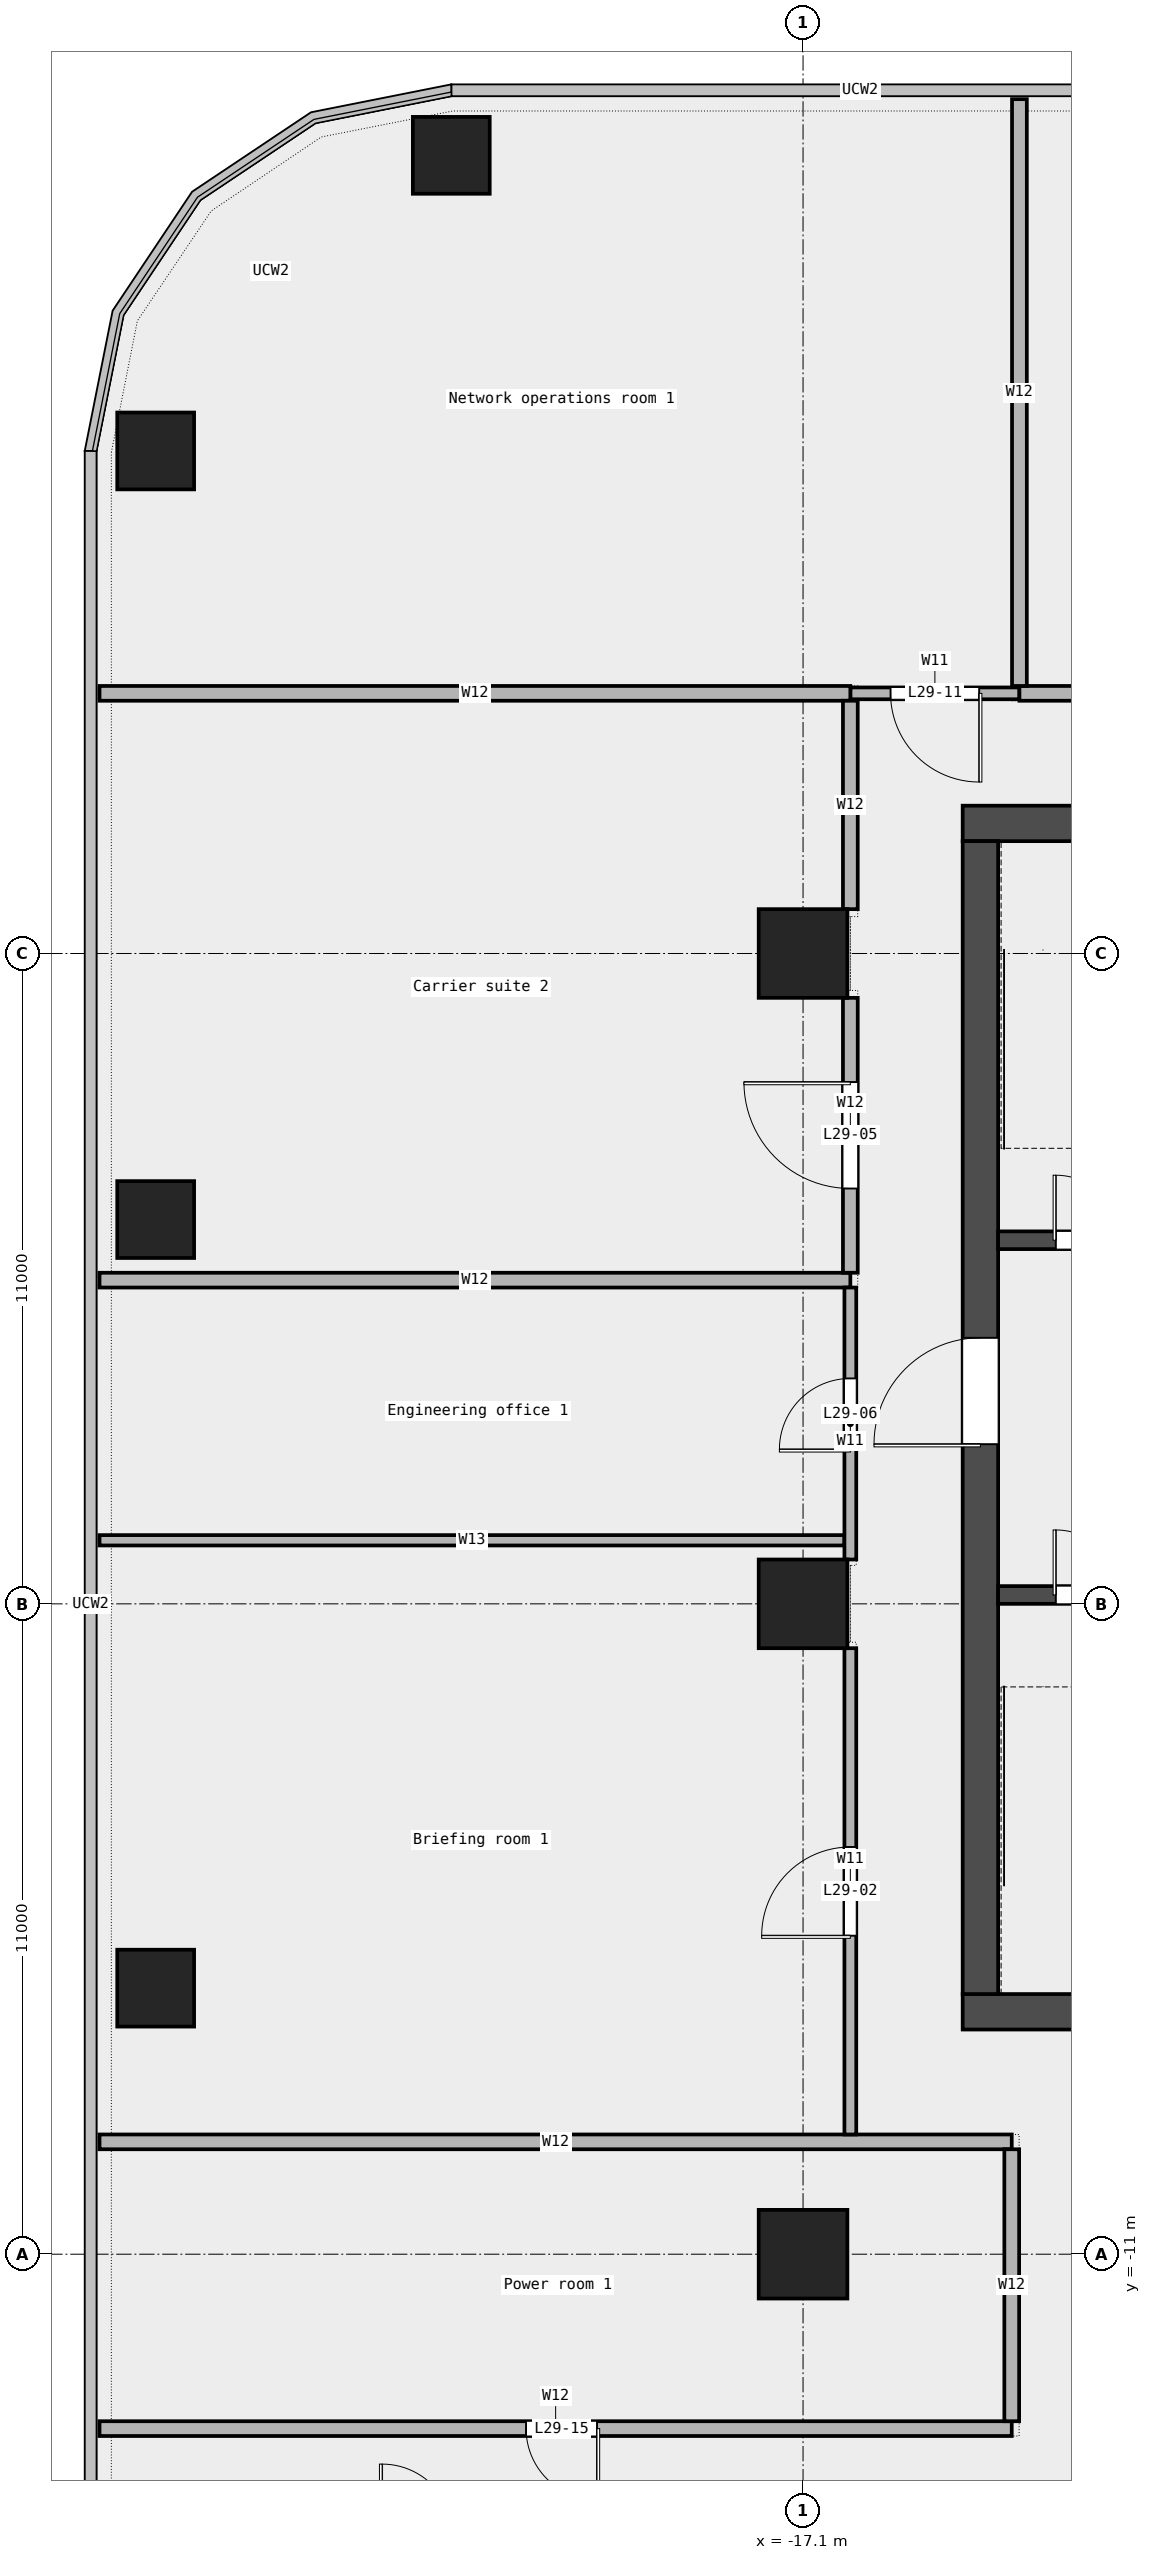
"""IFC4 building model, lengths in metres.
Left out: names, types, materials, properties, quantities, classifications, styles, units other than length and angle.
Written with IfcOpenShell. Run it as: python <this file> out.ifc"""

import sys

from ifc_helpers import new_model, si_unit, direction, frame, frame_2d, origin, origin_2d, place, context, subcontext, project, spatial, rectangle, extrude, element, fill, save


model = new_model("IFC4")
c1 = context("Model", 3, precision=1e-05, world=origin(), true_north=direction((0.0, 1.0)))
c2 = subcontext(c1, "Body", "Model", "MODEL_VIEW")
j1 = project(units=[si_unit("LENGTHUNIT", "METRE"), si_unit("PLANEANGLEUNIT", "RADIAN")], contexts=[c1])
p1 = place(None, origin())
s1 = spatial("IfcSite", under=j1, at=p1, CompositionType="ELEMENT")
p2 = place(p1, origin())
s2 = spatial("IfcBuilding", under=s1, at=p2, CompositionType="ELEMENT")
p3 = place(p2, frame((0.0, 0.0, 144.1)))
s3 = spatial("IfcBuildingStorey", under=s2, at=p3, CompositionType="ELEMENT", Elevation=144.1)
for number, where, z_axis, x_axis in (
    (1, (-23.05, 24.5, 0.0), (0.0, 0.0, 1.0), (1.0, 0.0, 0.0)),
    (2, (-28.05, 19.5, 0.0), (0.0, 0.0, 1.0), (1.0, 0.0, 0.0)),
    (3, (-28.05, 6.5, 0.0), (0.0, 0.0, 1.0), (1.0, 0.0, 0.0)),
    (4, (-28.05, -6.5, 0.0), (0.0, 0.0, 1.0), (1.0, 0.0, 0.0)),
):
    element("IfcColumn", number, at=place(p3, frame(where, z_axis=z_axis, x_axis=x_axis)), inside=s3, PredefinedType="COLUMN", context=c2, shape_type="SweptSolid", body=[
        extrude(rectangle(XDim=1.3, YDim=1.3, at=origin_2d()), origin(), (0.0, 0.0, 1.0), 3.9),
    ])
for number, where, z_axis, x_axis in (
    (5, (-17.1, -11.0, 0.0), (0.0, 0.0, 1.0), (1.0, 0.0, 0.0)),
    (6, (-17.1, 0.0, 0.0), (0.0, 0.0, 1.0), (1.0, 0.0, 0.0)),
    (7, (-17.1, 11.0, 0.0), (0.0, 0.0, 1.0), (1.0, 0.0, 0.0)),
):
    element("IfcColumn", number, at=place(p3, frame(where, z_axis=z_axis, x_axis=x_axis)), inside=s3, PredefinedType="COLUMN", context=c2, shape_type="SweptSolid", body=[
        extrude(rectangle(XDim=1.5, YDim=1.5, at=origin_2d()), origin(), (0.0, 0.0, 1.0), 3.9),
    ])
p4 = place(p3, frame((-29.0, -13.95, 0.0), z_axis=(0.0, 0.0, 1.0), x_axis=(1.0, 0.0, 0.0)))
e8 = element("IfcWall", 8, at=p4, inside=s3, PredefinedType="PARTITIONING", context=c2, shape_type="SweptSolid", body=[
    extrude(rectangle(XDim=15.43, YDim=0.25, at=frame_2d((7.715, 0.0))), origin(), (0.0, 0.0, 1.0), 3.9),
])
p5 = place(p4, frame((7.215, 0.0, 0.0)))
e9 = element("IfcOpeningElement", 9, at=p5, cuts=e8, PredefinedType="OPENING", context=c2, shape_type="SweptSolid", body=[
    extrude(rectangle(XDim=1.2, YDim=2.1, at=frame_2d((0.6, 1.05))), frame((0.0, 0.137, 0.0), z_axis=(0.0, -1.0, 0.0), x_axis=(1.0, 0.0, 0.0)), (0.0, 0.0, 1.0), 0.274),
])
p6 = place(p3, frame((-29.0, -9.1, 0.0), z_axis=(0.0, 0.0, 1.0), x_axis=(1.0, 0.0, 0.0)))
e10 = element("IfcWall", 10, at=p6, inside=s3, PredefinedType="PARTITIONING", context=c2, shape_type="SweptSolid", body=[
    extrude(rectangle(XDim=15.43, YDim=0.25, at=frame_2d((7.715, 0.0))), origin(), (0.0, 0.0, 1.0), 3.9),
])
p7 = place(p3, frame((-29.0, 1.075, 0.0), z_axis=(0.0, 0.0, 1.0), x_axis=(1.0, 0.0, 0.0)))
e11 = element("IfcWall", 11, at=p7, inside=s3, PredefinedType="PARTITIONING", context=c2, shape_type="SweptSolid", body=[
    extrude(rectangle(XDim=12.6, YDim=0.175, at=frame_2d((6.3, 0.0))), origin(), (0.0, 0.0, 1.0), 3.9),
])
p8 = place(p3, frame((-29.0, 5.475, 0.0), z_axis=(0.0, 0.0, 1.0), x_axis=(1.0, 0.0, 0.0)))
e12 = element("IfcWall", 12, at=p8, inside=s3, PredefinedType="PARTITIONING", context=c2, shape_type="SweptSolid", body=[
    extrude(rectangle(XDim=12.7, YDim=0.25, at=frame_2d((6.35, 0.0))), origin(), (0.0, 0.0, 1.0), 3.9),
])
p9 = place(p3, frame((-16.3, 15.4, 0.0), z_axis=(0.0, 0.0, 1.0), x_axis=(1.0, 0.0, 0.0)))
e13 = element("IfcWall", 13, at=p9, inside=s3, PredefinedType="PARTITIONING", context=c2, shape_type="SweptSolid", body=[
    extrude(rectangle(XDim=2.86, YDim=0.2, at=frame_2d((1.43, 0.0))), origin(), (0.0, 0.0, 1.0), 3.9),
])
p10 = place(p9, frame((0.68, 0.0, 0.0)))
e14 = element("IfcOpeningElement", 14, at=p10, cuts=e13, PredefinedType="OPENING", context=c2, shape_type="SweptSolid", body=[
    extrude(rectangle(XDim=1.5, YDim=2.1, at=frame_2d((0.75, 1.05))), frame((0.0, 0.112, 0.0), z_axis=(0.0, -1.0, 0.0), x_axis=(1.0, 0.0, 0.0)), (0.0, 0.0, 1.0), 0.224),
])
p11 = place(p3, frame((-29.0, 15.4, 0.0), z_axis=(0.0, 0.0, 1.0), x_axis=(1.0, 0.0, 0.0)))
e15 = element("IfcWall", 15, at=p11, inside=s3, PredefinedType="PARTITIONING", context=c2, shape_type="SweptSolid", body=[
    extrude(rectangle(XDim=12.7, YDim=0.25, at=frame_2d((6.35, 0.0))), origin(), (0.0, 0.0, 1.0), 3.9),
])
p12 = place(p3, frame((-13.44, 15.4, 0.0), z_axis=(0.0, 0.0, 1.0), x_axis=(1.0, 0.0, 0.0)))
e16 = element("IfcWall", 16, at=p12, inside=s3, PredefinedType="PARTITIONING", context=c2, shape_type="SweptSolid", body=[
    extrude(rectangle(XDim=4.22, YDim=0.25, at=frame_2d((2.11, 0.0))), origin(), (0.0, 0.0, 1.0), 3.9),
])
p13 = place(p12, frame((1.66, 0.0, 0.0)))
e17 = element("IfcOpeningElement", 17, at=p13, cuts=e16, PredefinedType="OPENING", context=c2, shape_type="SweptSolid", body=[
    extrude(rectangle(XDim=0.9, YDim=2.1, at=frame_2d((0.45, 1.05))), frame((0.0, 0.137, 0.0), z_axis=(0.0, -1.0, 0.0), x_axis=(1.0, 0.0, 0.0)), (0.0, 0.0, 1.0), 0.274),
])
p14 = place(p3, frame((-16.3, -8.975, 0.0), z_axis=(0.0, 0.0, 1.0), x_axis=(0.0, 1.0, 0.0)))
e18 = element("IfcWall", 18, at=p14, inside=s3, PredefinedType="PARTITIONING", context=c2, shape_type="SweptSolid", body=[
    extrude(rectangle(XDim=8.225, YDim=0.2, at=frame_2d((4.113, 0.0))), origin(), (0.0, 0.0, 1.0), 3.9),
])
p15 = place(p14, frame((3.363, 0.0, 0.0)))
e19 = element("IfcOpeningElement", 19, at=p15, cuts=e18, PredefinedType="OPENING", context=c2, shape_type="SweptSolid", body=[
    extrude(rectangle(XDim=1.5, YDim=2.1, at=frame_2d((0.75, 1.05))), frame((0.0, 0.112, 0.0), z_axis=(0.0, -1.0, 0.0), x_axis=(1.0, 0.0, 0.0)), (0.0, 0.0, 1.0), 0.224),
])
p16 = place(p3, frame((-16.3, 0.75, 0.0), z_axis=(0.0, 0.0, 1.0), x_axis=(0.0, 1.0, 0.0)))
e20 = element("IfcWall", 20, at=p16, inside=s3, PredefinedType="PARTITIONING", context=c2, shape_type="SweptSolid", body=[
    extrude(rectangle(XDim=4.6, YDim=0.2, at=frame_2d((2.3, 0.0))), origin(), (0.0, 0.0, 1.0), 3.9),
])
p17 = place(p16, frame((1.863, 0.0, 0.0)))
e21 = element("IfcOpeningElement", 21, at=p17, cuts=e20, PredefinedType="OPENING", context=c2, shape_type="SweptSolid", body=[
    extrude(rectangle(XDim=1.2, YDim=2.1, at=frame_2d((0.6, 1.05))), frame((0.0, 0.112, 0.0), z_axis=(0.0, -1.0, 0.0), x_axis=(1.0, 0.0, 0.0)), (0.0, 0.0, 1.0), 0.224),
])
p18 = place(p3, frame((-16.3, 5.6, 0.0), z_axis=(0.0, 0.0, 1.0), x_axis=(0.0, 1.0, 0.0)))
e22 = element("IfcWall", 22, at=p18, inside=s3, PredefinedType="PARTITIONING", context=c2, shape_type="SweptSolid", body=[
    extrude(rectangle(XDim=4.65, YDim=0.25, at=frame_2d((2.325, 0.0))), origin(), (0.0, 0.0, 1.0), 3.9),
])
p19 = place(p18, frame((1.425, 0.0, 0.0)))
e23 = element("IfcOpeningElement", 23, at=p19, cuts=e22, PredefinedType="OPENING", context=c2, shape_type="SweptSolid", body=[
    extrude(rectangle(XDim=1.8, YDim=2.1, at=frame_2d((0.9, 1.05))), frame((0.0, 0.137, 0.0), z_axis=(0.0, -1.0, 0.0), x_axis=(1.0, 0.0, 0.0)), (0.0, 0.0, 1.0), 0.274),
])
p20 = place(p3, frame((-16.3, 11.75, 0.0), z_axis=(0.0, 0.0, 1.0), x_axis=(0.0, 1.0, 0.0)))
e24 = element("IfcWall", 24, at=p20, inside=s3, PredefinedType="PARTITIONING", context=c2, shape_type="SweptSolid", body=[
    extrude(rectangle(XDim=3.525, YDim=0.25, at=frame_2d((1.762, 0.0))), origin(), (0.0, 0.0, 1.0), 3.9),
])
p21 = place(p3, frame((-13.57, -13.825, 0.0), z_axis=(0.0, 0.0, 1.0), x_axis=(0.0, 1.0, 0.0)))
e25 = element("IfcWall", 25, at=p21, inside=s3, PredefinedType="PARTITIONING", context=c2, shape_type="SweptSolid", body=[
    extrude(rectangle(XDim=4.6, YDim=0.25, at=frame_2d((2.3, 0.0))), origin(), (0.0, 0.0, 1.0), 3.9),
])
p22 = place(p3, frame((-13.44, 15.525, 0.0), z_axis=(0.0, 0.0, 1.0), x_axis=(0.0, 1.0, 0.0)))
e26 = element("IfcWall", 26, at=p22, inside=s3, PredefinedType="PARTITIONING", context=c2, shape_type="SweptSolid", body=[
    extrude(rectangle(XDim=9.925, YDim=0.25, at=frame_2d((4.962, 0.0))), origin(), (0.0, 0.0, 1.0), 3.9),
])
p23 = place(p3, frame((-14.4, -6.9, 0.0), z_axis=(0.0, 0.0, 1.0), x_axis=(1.0, 0.0, 0.0)))
e27 = element("IfcWall", 27, at=p23, inside=s3, PredefinedType="SHEAR", context=c2, shape_type="SweptSolid", body=[
    extrude(rectangle(XDim=28.8, YDim=0.6, at=frame_2d((14.4, 0.0))), origin(), (0.0, 0.0, 1.0), 4.2),
])
p24 = place(p23, frame((4.9, 0.0, 0.0)))
e28 = element("IfcOpeningElement", 28, at=p24, cuts=e27, PredefinedType="OPENING", context=c2, shape_type="SweptSolid", body=[
    extrude(rectangle(XDim=1.0, YDim=2.1, at=frame_2d((0.5, 1.05))), frame((0.0, 0.312, 0.0), z_axis=(0.0, -1.0, 0.0), x_axis=(1.0, 0.0, 0.0)), (0.0, 0.0, 1.0), 0.624),
])
p25 = place(p23, frame((9.3, 0.0, 0.0)))
e29 = element("IfcOpeningElement", 29, at=p25, cuts=e27, PredefinedType="OPENING", context=c2, shape_type="SweptSolid", body=[
    extrude(rectangle(XDim=1.2, YDim=2.1, at=frame_2d((0.6, 1.05))), frame((0.0, 0.312, 0.0), z_axis=(0.0, -1.0, 0.0), x_axis=(1.0, 0.0, 0.0)), (0.0, 0.0, 1.0), 0.624),
])
p26 = place(p23, frame((14.462, 0.0, 0.0)))
e30 = element("IfcOpeningElement", 30, at=p26, cuts=e27, PredefinedType="OPENING", context=c2, shape_type="SweptSolid", body=[
    extrude(rectangle(XDim=1.0, YDim=2.1, at=frame_2d((0.5, 1.05))), frame((0.0, 0.312, 0.0), z_axis=(0.0, -1.0, 0.0), x_axis=(1.0, 0.0, 0.0)), (0.0, 0.0, 1.0), 0.624),
])
p27 = place(p23, frame((18.75, 0.0, 0.0)))
e31 = element("IfcOpeningElement", 31, at=p27, cuts=e27, PredefinedType="OPENING", context=c2, shape_type="SweptSolid", body=[
    extrude(rectangle(XDim=1.8, YDim=2.1, at=frame_2d((0.9, 1.05))), frame((0.0, 0.312, 0.0), z_axis=(0.0, -1.0, 0.0), x_axis=(1.0, 0.0, 0.0)), (0.0, 0.0, 1.0), 0.624),
])
p28 = place(p23, frame((23.087, 0.0, 0.0)))
e32 = element("IfcOpeningElement", 32, at=p28, cuts=e27, PredefinedType="OPENING", context=c2, shape_type="SweptSolid", body=[
    extrude(rectangle(XDim=1.0, YDim=2.1, at=frame_2d((0.5, 1.05))), frame((0.0, 0.312, 0.0), z_axis=(0.0, -1.0, 0.0), x_axis=(1.0, 0.0, 0.0)), (0.0, 0.0, 1.0), 0.624),
])
p29 = place(p3, frame((-14.4, 13.2, 0.0), z_axis=(0.0, 0.0, 1.0), x_axis=(1.0, 0.0, 0.0)))
e33 = element("IfcWall", 33, at=p29, inside=s3, PredefinedType="SHEAR", context=c2, shape_type="SweptSolid", body=[
    extrude(rectangle(XDim=28.8, YDim=0.6, at=frame_2d((14.4, 0.0))), origin(), (0.0, 0.0, 1.0), 4.2),
])
p30 = place(p29, frame((6.775, 0.0, 0.0)))
e34 = element("IfcOpeningElement", 34, at=p30, cuts=e33, PredefinedType="OPENING", context=c2, shape_type="SweptSolid", body=[
    extrude(rectangle(XDim=1.0, YDim=2.1, at=frame_2d((0.5, 1.05))), frame((0.0, 0.312, 0.0), z_axis=(0.0, -1.0, 0.0), x_axis=(1.0, 0.0, 0.0)), (0.0, 0.0, 1.0), 0.624),
])
p31 = place(p29, frame((13.525, 0.0, 0.0)))
e35 = element("IfcOpeningElement", 35, at=p31, cuts=e33, PredefinedType="OPENING", context=c2, shape_type="SweptSolid", body=[
    extrude(rectangle(XDim=1.0, YDim=2.1, at=frame_2d((0.5, 1.05))), frame((0.0, 0.312, 0.0), z_axis=(0.0, -1.0, 0.0), x_axis=(1.0, 0.0, 0.0)), (0.0, 0.0, 1.0), 0.624),
])
p32 = place(p29, frame((20.65, 0.0, 0.0)))
e36 = element("IfcOpeningElement", 36, at=p32, cuts=e33, PredefinedType="OPENING", context=c2, shape_type="SweptSolid", body=[
    extrude(rectangle(XDim=1.0, YDim=2.1, at=frame_2d((0.5, 1.05))), frame((0.0, 0.312, 0.0), z_axis=(0.0, -1.0, 0.0), x_axis=(1.0, 0.0, 0.0)), (0.0, 0.0, 1.0), 0.624),
])
p33 = place(p3, frame((-14.1, -6.6, 0.0), z_axis=(0.0, 0.0, 1.0), x_axis=(0.0, 1.0, 0.0)))
e37 = element("IfcWall", 37, at=p33, inside=s3, PredefinedType="SHEAR", context=c2, shape_type="SweptSolid", body=[
    extrude(rectangle(XDim=19.5, YDim=0.6, at=frame_2d((9.75, 0.0))), origin(), (0.0, 0.0, 1.0), 4.2),
])
p34 = place(p33, frame((9.3, 0.0, 0.0)))
e38 = element("IfcOpeningElement", 38, at=p34, cuts=e37, PredefinedType="OPENING", context=c2, shape_type="SweptSolid", body=[
    extrude(rectangle(XDim=1.8, YDim=2.1, at=frame_2d((0.9, 1.05))), frame((0.0, 0.312, 0.0), z_axis=(0.0, -1.0, 0.0), x_axis=(1.0, 0.0, 0.0)), (0.0, 0.0, 1.0), 0.624),
])
p35 = place(p3, frame((-13.8, 0.15, 0.0), z_axis=(0.0, 0.0, 1.0), x_axis=(1.0, 0.0, 0.0)))
e39 = element("IfcWall", 39, at=p35, inside=s3, PredefinedType="SOLIDWALL", context=c2, shape_type="SweptSolid", body=[
    extrude(rectangle(XDim=3.15, YDim=0.3, at=frame_2d((1.575, 0.0))), origin(), (0.0, 0.0, 1.0), 4.2),
])
p36 = place(p35, frame((0.975, 0.0, 0.0)))
e40 = element("IfcOpeningElement", 40, at=p36, cuts=e39, PredefinedType="OPENING", context=c2, shape_type="SweptSolid", body=[
    extrude(rectangle(XDim=1.1, YDim=2.1, at=frame_2d((0.55, 1.05))), frame((0.0, 0.162, 0.0), z_axis=(0.0, -1.0, 0.0), x_axis=(1.0, 0.0, 0.0)), (0.0, 0.0, 1.0), 0.324),
])
p37 = place(p3, frame((-13.8, 6.15, 0.0), z_axis=(0.0, 0.0, 1.0), x_axis=(1.0, 0.0, 0.0)))
e41 = element("IfcWall", 41, at=p37, inside=s3, PredefinedType="SOLIDWALL", context=c2, shape_type="SweptSolid", body=[
    extrude(rectangle(XDim=3.15, YDim=0.3, at=frame_2d((1.575, 0.0))), origin(), (0.0, 0.0, 1.0), 4.2),
])
p38 = place(p37, frame((0.975, 0.0, 0.0)))
e42 = element("IfcOpeningElement", 42, at=p38, cuts=e41, PredefinedType="OPENING", context=c2, shape_type="SweptSolid", body=[
    extrude(rectangle(XDim=1.1, YDim=2.1, at=frame_2d((0.55, 1.05))), frame((0.0, 0.162, 0.0), z_axis=(0.0, -1.0, 0.0), x_axis=(1.0, 0.0, 0.0)), (0.0, 0.0, 1.0), 0.324),
])
p39 = place(p15, origin())
e43 = element("IfcDoor", 43, at=p39, inside=s3, OperationType="DOUBLE_DOOR_SINGLE_SWING", PredefinedType="DOOR", context=c2, shape_type="SweptSolid", body=[
    extrude(rectangle(XDim=1.5, YDim=2.1, at=frame_2d((0.75, 1.05))), frame((0.0, 0.025, 0.0), z_axis=(0.0, -1.0, 0.0), x_axis=(1.0, 0.0, 0.0)), (0.0, 0.0, 1.0), 0.05),
])
fill(e19, e43)
p40 = place(p19, origin())
e44 = element("IfcDoor", 44, at=p40, inside=s3, OperationType="DOUBLE_DOOR_SINGLE_SWING", PredefinedType="DOOR", context=c2, shape_type="SweptSolid", body=[
    extrude(rectangle(XDim=1.8, YDim=2.1, at=frame_2d((0.9, 1.05))), frame((0.0, 0.025, 0.0), z_axis=(0.0, -1.0, 0.0), x_axis=(1.0, 0.0, 0.0)), (0.0, 0.0, 1.0), 0.05),
])
fill(e23, e44)
p41 = place(p17, origin())
e45 = element("IfcDoor", 45, at=p41, inside=s3, OperationType="SINGLE_SWING_LEFT", PredefinedType="DOOR", context=c2, shape_type="SweptSolid", body=[
    extrude(rectangle(XDim=1.2, YDim=2.1, at=frame_2d((0.6, 1.05))), frame((0.0, 0.025, 0.0), z_axis=(0.0, -1.0, 0.0), x_axis=(1.0, 0.0, 0.0)), (0.0, 0.0, 1.0), 0.05),
])
fill(e21, e45)
p42 = place(p10, origin())
e46 = element("IfcDoor", 46, at=p42, inside=s3, OperationType="DOUBLE_DOOR_SINGLE_SWING", PredefinedType="DOOR", context=c2, shape_type="SweptSolid", body=[
    extrude(rectangle(XDim=1.5, YDim=2.1, at=frame_2d((0.75, 1.05))), frame((0.0, 0.025, 0.0), z_axis=(0.0, -1.0, 0.0), x_axis=(1.0, 0.0, 0.0)), (0.0, 0.0, 1.0), 0.05),
])
fill(e14, e46)
p43 = place(p5, origin())
e47 = element("IfcDoor", 47, at=p43, inside=s3, OperationType="SINGLE_SWING_LEFT", PredefinedType="DOOR", context=c2, shape_type="SweptSolid", body=[
    extrude(rectangle(XDim=1.2, YDim=2.1, at=frame_2d((0.6, 1.05))), frame((0.0, 0.025, 0.0), z_axis=(0.0, -1.0, 0.0), x_axis=(1.0, 0.0, 0.0)), (0.0, 0.0, 1.0), 0.05),
])
fill(e9, e47)
p44 = place(p36, origin())
e48 = element("IfcDoor", 48, at=p44, inside=s3, OperationType="SINGLE_SWING_LEFT", PredefinedType="DOOR", context=c2, shape_type="SweptSolid", body=[
    extrude(rectangle(XDim=1.1, YDim=2.1, at=frame_2d((0.55, 1.05))), frame((0.0, 0.025, 0.0), z_axis=(0.0, -1.0, 0.0), x_axis=(1.0, 0.0, 0.0)), (0.0, 0.0, 1.0), 0.05),
])
fill(e40, e48)
p45 = place(p38, origin())
e49 = element("IfcDoor", 49, at=p45, inside=s3, OperationType="SINGLE_SWING_LEFT", PredefinedType="DOOR", context=c2, shape_type="SweptSolid", body=[
    extrude(rectangle(XDim=1.1, YDim=2.1, at=frame_2d((0.55, 1.05))), frame((0.0, 0.025, 0.0), z_axis=(0.0, -1.0, 0.0), x_axis=(1.0, 0.0, 0.0)), (0.0, 0.0, 1.0), 0.05),
])
fill(e42, e49)
p46 = place(p34, origin())
e50 = element("IfcDoor", 50, at=p46, inside=s3, OperationType="DOUBLE_DOOR_SINGLE_SWING", PredefinedType="DOOR", context=c2, shape_type="SweptSolid", body=[
    extrude(rectangle(XDim=1.8, YDim=2.1, at=frame_2d((0.9, 1.05))), frame((0.0, 0.025, 0.0), z_axis=(0.0, -1.0, 0.0), x_axis=(1.0, 0.0, 0.0)), (0.0, 0.0, 1.0), 0.05),
])
fill(e38, e50)
save(model, sys.argv[1])
